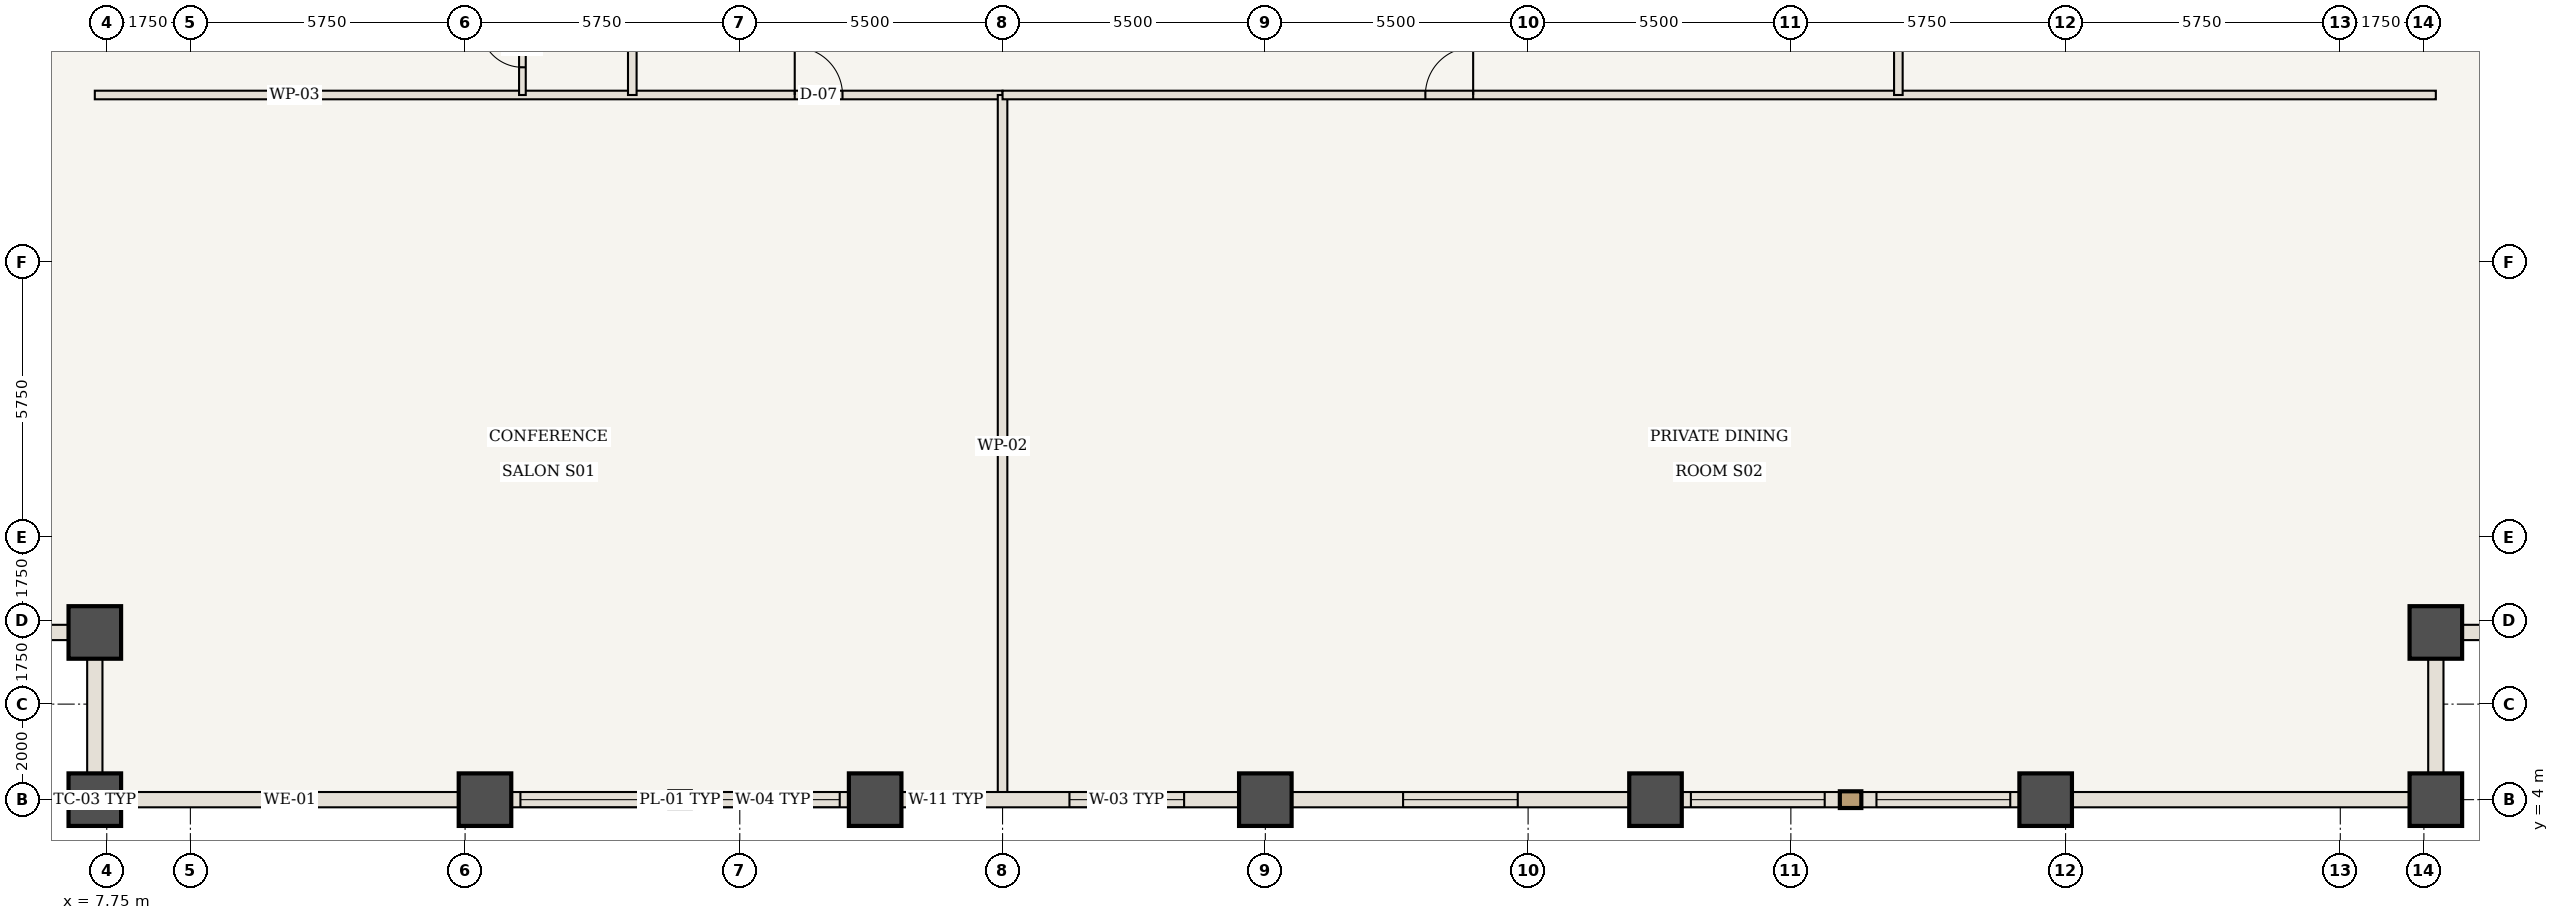
"""IFC4 building model, lengths in metres.
Left out: names, types, materials, properties, quantities, classifications, styles, units other than length and angle.
Written with IfcOpenShell. Run it as: python <this file> out.ifc"""

import sys

from ifc_helpers import new_model, si_unit, direction, frame, frame_2d, origin, origin_2d, place, context, subcontext, project, spatial, rectangle, extrude, element, fill, save


model = new_model("IFC4")
c1 = context("Model", 3, precision=1e-05, world=origin(), true_north=direction((0.0, 1.0)))
c2 = subcontext(c1, "Body", "Model", "MODEL_VIEW")
j1 = project(units=[si_unit("LENGTHUNIT", "METRE"), si_unit("PLANEANGLEUNIT", "RADIAN")], contexts=[c1])
p1 = place(None, origin())
s1 = spatial("IfcSite", under=j1, at=p1, CompositionType="ELEMENT")
p2 = place(p1, origin())
s2 = spatial("IfcBuilding", under=s1, at=p2, CompositionType="ELEMENT")
p3 = place(p2, frame((0.0, 0.0, 82.25)))
s3 = spatial("IfcBuildingStorey", under=s2, at=p3, CompositionType="ELEMENT", Elevation=82.25)
for number, where, z_axis, x_axis in (
    (1, (7.5, 4.0, 0.0), (0.0, 0.0, 1.0), (1.0, 0.0, 0.0)),
    (2, (7.5, 7.5, 0.0), (0.0, 0.0, 1.0), (1.0, 0.0, 0.0)),
    (3, (56.5, 4.0, 0.0), (0.0, 0.0, 1.0), (1.0, 0.0, 0.0)),
    (4, (56.5, 7.5, 0.0), (0.0, 0.0, 1.0), (1.0, 0.0, 0.0)),
    (5, (15.667, 4.0, 0.0), (0.0, 0.0, 1.0), (1.0, 0.0, 0.0)),
    (6, (23.833, 4.0, 0.0), (0.0, 0.0, 1.0), (1.0, 0.0, 0.0)),
    (7, (32.0, 4.0, 0.0), (0.0, 0.0, 1.0), (1.0, 0.0, 0.0)),
    (8, (40.167, 4.0, 0.0), (0.0, 0.0, 1.0), (1.0, 0.0, 0.0)),
    (9, (48.333, 4.0, 0.0), (0.0, 0.0, 1.0), (1.0, 0.0, 0.0)),
):
    element("IfcColumn", number, at=place(p3, frame(where, z_axis=z_axis, x_axis=x_axis)), inside=s3, PredefinedType="COLUMN", context=c2, shape_type="SweptSolid", body=[
        extrude(rectangle(XDim=1.1, YDim=1.1, at=origin_2d()), origin(), (0.0, 0.0, 1.0), 3.5),
    ])
p4 = place(p3, frame((7.5, 18.75, 0.0), z_axis=(0.0, 0.0, 1.0), x_axis=(1.0, 0.0, 0.0)))
e10 = element("IfcWall", 10, at=p4, inside=s3, PredefinedType="STANDARD", context=c2, shape_type="SweptSolid", body=[
    extrude(rectangle(XDim=19.0, YDim=0.18, at=frame_2d((9.5, 0.0))), origin(), (0.0, 0.0, 1.0), 3.32),
])
p5 = place(p4, frame((14.65, 0.0, 0.0)))
e11 = element("IfcOpeningElement", 11, at=p5, cuts=e10, PredefinedType="OPENING", context=c2, shape_type="SweptSolid", body=[
    extrude(rectangle(XDim=1.0, YDim=2.15, at=frame_2d((0.5, 1.075))), frame((0.0, 0.1, 0.0), z_axis=(0.0, -1.0, 0.0), x_axis=(1.0, 0.0, 0.0)), (0.0, 0.0, 1.0), 0.2),
])
p6 = place(p3, frame((26.5, 4.06, 0.0), z_axis=(0.0, 0.0, 1.0), x_axis=(0.0, 1.0, 0.0)))
e12 = element("IfcWall", 12, at=p6, inside=s3, PredefinedType="STANDARD", context=c2, shape_type="SweptSolid", body=[
    extrude(rectangle(XDim=14.69, YDim=0.2, at=frame_2d((7.345, 0.0))), origin(), (0.0, 0.0, 1.0), 3.32),
])
p7 = place(p3, frame((26.5, 18.75, 0.0), z_axis=(0.0, 0.0, 1.0), x_axis=(1.0, 0.0, 0.0)))
e13 = element("IfcWall", 13, at=p7, inside=s3, PredefinedType="STANDARD", context=c2, shape_type="SweptSolid", body=[
    extrude(rectangle(XDim=30.0, YDim=0.18, at=frame_2d((15.0, 0.0))), origin(), (0.0, 0.0, 1.0), 3.32),
])
p8 = place(p7, frame((8.85, 0.0, 0.0)))
e14 = element("IfcOpeningElement", 14, at=p8, cuts=e13, PredefinedType="OPENING", context=c2, shape_type="SweptSolid", body=[
    extrude(rectangle(XDim=1.0, YDim=2.15, at=frame_2d((0.5, 1.075))), frame((0.0, 0.1, 0.0), z_axis=(0.0, -1.0, 0.0), x_axis=(1.0, 0.0, 0.0)), (0.0, 0.0, 1.0), 0.2),
])
p9 = place(p3, frame((16.45, 18.75, 0.0), z_axis=(0.0, 0.0, 1.0), x_axis=(0.0, 1.0, 0.0)))
e15 = element("IfcWall", 15, at=p9, inside=s3, PredefinedType="STANDARD", context=c2, shape_type="SweptSolid", body=[
    extrude(rectangle(XDim=1.95, YDim=0.14, at=frame_2d((0.975, 0.0))), origin(), (0.0, 0.0, 1.0), 3.32),
])
p10 = place(p9, frame((0.58, 0.0, 0.0)))
e16 = element("IfcOpeningElement", 16, at=p10, cuts=e15, PredefinedType="OPENING", context=c2, shape_type="SweptSolid", body=[
    extrude(rectangle(XDim=0.88, YDim=2.1, at=frame_2d((0.44, 1.05))), frame((0.0, 0.08, 0.0), z_axis=(0.0, -1.0, 0.0), x_axis=(1.0, 0.0, 0.0)), (0.0, 0.0, 1.0), 0.16),
])
p11 = place(p3, frame((18.75, 18.75, 0.0), z_axis=(0.0, 0.0, 1.0), x_axis=(0.0, 1.0, 0.0)))
e17 = element("IfcWall", 17, at=p11, inside=s3, PredefinedType="STANDARD", context=c2, shape_type="SweptSolid", body=[
    extrude(rectangle(XDim=4.75, YDim=0.18, at=frame_2d((2.375, 0.0))), origin(), (0.0, 0.0, 1.0), 3.32),
])
p12 = place(p11, frame((2.8, 0.0, 0.0)))
e18 = element("IfcOpeningElement", 18, at=p12, cuts=e17, PredefinedType="OPENING", context=c2, shape_type="SweptSolid", body=[
    extrude(rectangle(XDim=1.0, YDim=2.15, at=frame_2d((0.5, 1.075))), frame((0.0, 0.1, 0.0), z_axis=(0.0, -1.0, 0.0), x_axis=(1.0, 0.0, 0.0)), (0.0, 0.0, 1.0), 0.2),
])
p13 = place(p3, frame((45.25, 18.75, 0.0), z_axis=(0.0, 0.0, 1.0), x_axis=(0.0, 1.0, 0.0)))
e19 = element("IfcWall", 19, at=p13, inside=s3, PredefinedType="STANDARD", context=c2, shape_type="SweptSolid", body=[
    extrude(rectangle(XDim=12.25, YDim=0.18, at=frame_2d((6.125, 0.0))), origin(), (0.0, 0.0, 1.0), 3.32),
])
p14 = place(p13, frame((5.625, 0.0, 0.0)))
e20 = element("IfcOpeningElement", 20, at=p14, cuts=e19, PredefinedType="OPENING", context=c2, shape_type="SweptSolid", body=[
    extrude(rectangle(XDim=1.0, YDim=2.15, at=frame_2d((0.5, 1.075))), frame((0.0, 0.1, 0.0), z_axis=(0.0, -1.0, 0.0), x_axis=(1.0, 0.0, 0.0)), (0.0, 0.0, 1.0), 0.2),
])
p15 = place(p3, frame((15.667, 4.0, 0.0), z_axis=(0.0, 0.0, 1.0), x_axis=(-1.0, 0.0, 0.0)))
e21 = element("IfcWall", 21, at=p15, inside=s3, PredefinedType="USERDEFINED", context=c2, shape_type="SweptSolid", body=[
    extrude(rectangle(XDim=8.167, YDim=0.32, at=frame_2d((4.083, 0.0))), origin(), (0.0, 0.0, 1.0), 2.52),
])
p16 = place(p3, frame((23.833, 4.0, 0.0), z_axis=(0.0, 0.0, 1.0), x_axis=(-1.0, 0.0, 0.0)))
e22 = element("IfcWall", 22, at=p16, inside=s3, PredefinedType="USERDEFINED", context=c2, shape_type="SweptSolid", body=[
    extrude(rectangle(XDim=8.167, YDim=0.32, at=frame_2d((4.083, 0.0))), origin(), (0.0, 0.0, 1.0), 2.52),
])
p17 = place(p16, frame((0.742, 0.0, 0.85)))
e23 = element("IfcOpeningElement", 23, at=p17, cuts=e22, PredefinedType="OPENING", context=c2, shape_type="SweptSolid", body=[
    extrude(rectangle(XDim=2.8, YDim=1.47, at=frame_2d((1.4, 0.735))), frame((0.0, 0.17, 0.0), z_axis=(0.0, -1.0, 0.0), x_axis=(1.0, 0.0, 0.0)), (0.0, 0.0, 1.0), 0.34),
])
p18 = place(p16, frame((4.625, 0.0, 0.85)))
e24 = element("IfcOpeningElement", 24, at=p18, cuts=e22, PredefinedType="OPENING", context=c2, shape_type="SweptSolid", body=[
    extrude(rectangle(XDim=2.8, YDim=1.47, at=frame_2d((1.4, 0.735))), frame((0.0, 0.17, 0.0), z_axis=(0.0, -1.0, 0.0), x_axis=(1.0, 0.0, 0.0)), (0.0, 0.0, 1.0), 0.34),
])
p19 = place(p3, frame((32.0, 4.0, 0.0), z_axis=(0.0, 0.0, 1.0), x_axis=(-1.0, 0.0, 0.0)))
e25 = element("IfcWall", 25, at=p19, inside=s3, PredefinedType="USERDEFINED", context=c2, shape_type="SweptSolid", body=[
    extrude(rectangle(XDim=8.167, YDim=0.32, at=frame_2d((4.083, 0.0))), origin(), (0.0, 0.0, 1.0), 2.52),
])
p20 = place(p19, frame((1.7, 0.0, 0.85)))
e26 = element("IfcOpeningElement", 26, at=p20, cuts=e25, PredefinedType="OPENING", context=c2, shape_type="SweptSolid", body=[
    extrude(rectangle(XDim=2.4, YDim=1.47, at=frame_2d((1.2, 0.735))), frame((0.0, 0.17, 0.0), z_axis=(0.0, -1.0, 0.0), x_axis=(1.0, 0.0, 0.0)), (0.0, 0.0, 1.0), 0.34),
])
p21 = place(p19, frame((5.883, 0.0, 0.85)))
e27 = element("IfcOpeningElement", 27, at=p21, cuts=e25, PredefinedType="OPENING", context=c2, shape_type="SweptSolid", body=[
    extrude(rectangle(XDim=1.6, YDim=1.47, at=frame_2d((0.8, 0.735))), frame((0.0, 0.17, 0.0), z_axis=(0.0, -1.0, 0.0), x_axis=(1.0, 0.0, 0.0)), (0.0, 0.0, 1.0), 0.34),
])
p22 = place(p3, frame((40.167, 4.0, 0.0), z_axis=(0.0, 0.0, 1.0), x_axis=(-1.0, 0.0, 0.0)))
e28 = element("IfcWall", 28, at=p22, inside=s3, PredefinedType="USERDEFINED", context=c2, shape_type="SweptSolid", body=[
    extrude(rectangle(XDim=8.167, YDim=0.32, at=frame_2d((4.083, 0.0))), origin(), (0.0, 0.0, 1.0), 2.52),
])
p23 = place(p22, frame((2.883, 0.0, 0.85)))
e29 = element("IfcOpeningElement", 29, at=p23, cuts=e28, PredefinedType="OPENING", context=c2, shape_type="SweptSolid", body=[
    extrude(rectangle(XDim=2.4, YDim=1.47, at=frame_2d((1.2, 0.735))), frame((0.0, 0.17, 0.0), z_axis=(0.0, -1.0, 0.0), x_axis=(1.0, 0.0, 0.0)), (0.0, 0.0, 1.0), 0.34),
])
p24 = place(p3, frame((48.333, 4.0, 0.0), z_axis=(0.0, 0.0, 1.0), x_axis=(-1.0, 0.0, 0.0)))
e30 = element("IfcWall", 30, at=p24, inside=s3, PredefinedType="USERDEFINED", context=c2, shape_type="SweptSolid", body=[
    extrude(rectangle(XDim=8.167, YDim=0.32, at=frame_2d((4.083, 0.0))), origin(), (0.0, 0.0, 1.0), 2.52),
])
p25 = place(p24, frame((0.742, 0.0, 0.85)))
e31 = element("IfcOpeningElement", 31, at=p25, cuts=e30, PredefinedType="OPENING", context=c2, shape_type="SweptSolid", body=[
    extrude(rectangle(XDim=2.8, YDim=1.47, at=frame_2d((1.4, 0.735))), frame((0.0, 0.17, 0.0), z_axis=(0.0, -1.0, 0.0), x_axis=(1.0, 0.0, 0.0)), (0.0, 0.0, 1.0), 0.34),
])
p26 = place(p24, frame((4.625, 0.0, 0.85)))
e32 = element("IfcOpeningElement", 32, at=p26, cuts=e30, PredefinedType="OPENING", context=c2, shape_type="SweptSolid", body=[
    extrude(rectangle(XDim=2.8, YDim=1.47, at=frame_2d((1.4, 0.735))), frame((0.0, 0.17, 0.0), z_axis=(0.0, -1.0, 0.0), x_axis=(1.0, 0.0, 0.0)), (0.0, 0.0, 1.0), 0.34),
])
p27 = place(p3, frame((56.5, 4.0, 0.0), z_axis=(0.0, 0.0, 1.0), x_axis=(-1.0, 0.0, 0.0)))
e33 = element("IfcWall", 33, at=p27, inside=s3, PredefinedType="USERDEFINED", context=c2, shape_type="SweptSolid", body=[
    extrude(rectangle(XDim=8.167, YDim=0.32, at=frame_2d((4.083, 0.0))), origin(), (0.0, 0.0, 1.0), 2.52),
])
for number, where, z_axis, x_axis in (
    (34, (7.5, 4.0, 0.0), (0.0, 0.0, 1.0), (0.0, 1.0, 0.0)),
    (35, (7.5, 7.5, 0.0), (0.0, 0.0, 1.0), (-1.0, 0.0, 0.0)),
    (36, (56.5, 7.5, 0.0), (0.0, 0.0, 1.0), (0.0, -1.0, 0.0)),
    (37, (60.0, 7.5, 0.0), (0.0, 0.0, 1.0), (-1.0, 0.0, 0.0)),
):
    element("IfcWall", number, at=place(p3, frame(where, z_axis=z_axis, x_axis=x_axis)), inside=s3, PredefinedType="USERDEFINED", context=c2, shape_type="SweptSolid", body=[
        extrude(rectangle(XDim=3.5, YDim=0.32, at=frame_2d((1.75, 0.0))), origin(), (0.0, 0.0, 1.0), 2.52),
    ])
p28 = place(p5, origin())
e38 = element("IfcDoor", 38, at=p28, inside=s3, OperationType="SINGLE_SWING_LEFT", PredefinedType="DOOR", context=c2, shape_type="SweptSolid", body=[
    extrude(rectangle(XDim=1.0, YDim=2.15, at=frame_2d((0.5, 1.075))), frame((0.0, 0.025, 0.0), z_axis=(0.0, -1.0, 0.0), x_axis=(1.0, 0.0, 0.0)), (0.0, 0.0, 1.0), 0.05),
])
fill(e11, e38)
p29 = place(p8, origin())
e39 = element("IfcDoor", 39, at=p29, inside=s3, OperationType="SINGLE_SWING_RIGHT", PredefinedType="DOOR", context=c2, shape_type="SweptSolid", body=[
    extrude(rectangle(XDim=1.0, YDim=2.15, at=frame_2d((0.5, 1.075))), frame((0.0, 0.025, 0.0), z_axis=(0.0, -1.0, 0.0), x_axis=(1.0, 0.0, 0.0)), (0.0, 0.0, 1.0), 0.05),
])
fill(e14, e39)
p30 = place(p10, origin())
e40 = element("IfcDoor", 40, at=p30, inside=s3, OperationType="SINGLE_SWING_RIGHT", PredefinedType="DOOR", context=c2, shape_type="SweptSolid", body=[
    extrude(rectangle(XDim=0.88, YDim=2.1, at=frame_2d((0.44, 1.05))), frame((0.0, 0.025, 0.0), z_axis=(0.0, -1.0, 0.0), x_axis=(1.0, 0.0, 0.0)), (0.0, 0.0, 1.0), 0.05),
])
fill(e16, e40)
p31 = place(p17, origin())
e41 = element("IfcWindow", 41, at=p31, inside=s3, PartitioningType="SINGLE_PANEL", PredefinedType="WINDOW", context=c2, shape_type="SweptSolid", body=[
    extrude(rectangle(XDim=2.8, YDim=1.47, at=frame_2d((1.4, 0.735))), frame((0.0, 0.03, 0.0), z_axis=(0.0, -1.0, 0.0), x_axis=(1.0, 0.0, 0.0)), (0.0, 0.0, 1.0), 0.06),
])
fill(e23, e41)
p32 = place(p18, origin())
e42 = element("IfcWindow", 42, at=p32, inside=s3, PartitioningType="SINGLE_PANEL", PredefinedType="WINDOW", context=c2, shape_type="SweptSolid", body=[
    extrude(rectangle(XDim=2.8, YDim=1.47, at=frame_2d((1.4, 0.735))), frame((0.0, 0.03, 0.0), z_axis=(0.0, -1.0, 0.0), x_axis=(1.0, 0.0, 0.0)), (0.0, 0.0, 1.0), 0.06),
])
fill(e24, e42)
p33 = place(p20, origin())
e43 = element("IfcWindow", 43, at=p33, inside=s3, PartitioningType="SINGLE_PANEL", PredefinedType="WINDOW", context=c2, shape_type="SweptSolid", body=[
    extrude(rectangle(XDim=2.4, YDim=1.47, at=frame_2d((1.2, 0.735))), frame((0.0, 0.03, 0.0), z_axis=(0.0, -1.0, 0.0), x_axis=(1.0, 0.0, 0.0)), (0.0, 0.0, 1.0), 0.06),
])
fill(e26, e43)
p34 = place(p21, origin())
e44 = element("IfcWindow", 44, at=p34, inside=s3, PartitioningType="SINGLE_PANEL", PredefinedType="WINDOW", context=c2, shape_type="SweptSolid", body=[
    extrude(rectangle(XDim=1.6, YDim=1.47, at=frame_2d((0.8, 0.735))), frame((0.0, 0.03, 0.0), z_axis=(0.0, -1.0, 0.0), x_axis=(1.0, 0.0, 0.0)), (0.0, 0.0, 1.0), 0.06),
])
fill(e27, e44)
p35 = place(p23, origin())
e45 = element("IfcWindow", 45, at=p35, inside=s3, PartitioningType="SINGLE_PANEL", PredefinedType="WINDOW", context=c2, shape_type="SweptSolid", body=[
    extrude(rectangle(XDim=2.4, YDim=1.47, at=frame_2d((1.2, 0.735))), frame((0.0, 0.03, 0.0), z_axis=(0.0, -1.0, 0.0), x_axis=(1.0, 0.0, 0.0)), (0.0, 0.0, 1.0), 0.06),
])
fill(e29, e45)
p36 = place(p25, origin())
e46 = element("IfcWindow", 46, at=p36, inside=s3, PartitioningType="SINGLE_PANEL", PredefinedType="WINDOW", context=c2, shape_type="SweptSolid", body=[
    extrude(rectangle(XDim=2.8, YDim=1.47, at=frame_2d((1.4, 0.735))), frame((0.0, 0.03, 0.0), z_axis=(0.0, -1.0, 0.0), x_axis=(1.0, 0.0, 0.0)), (0.0, 0.0, 1.0), 0.06),
])
fill(e31, e46)
p37 = place(p26, origin())
e47 = element("IfcWindow", 47, at=p37, inside=s3, PartitioningType="SINGLE_PANEL", PredefinedType="WINDOW", context=c2, shape_type="SweptSolid", body=[
    extrude(rectangle(XDim=2.8, YDim=1.47, at=frame_2d((1.4, 0.735))), frame((0.0, 0.03, 0.0), z_axis=(0.0, -1.0, 0.0), x_axis=(1.0, 0.0, 0.0)), (0.0, 0.0, 1.0), 0.06),
])
fill(e32, e47)
save(model, sys.argv[1])
